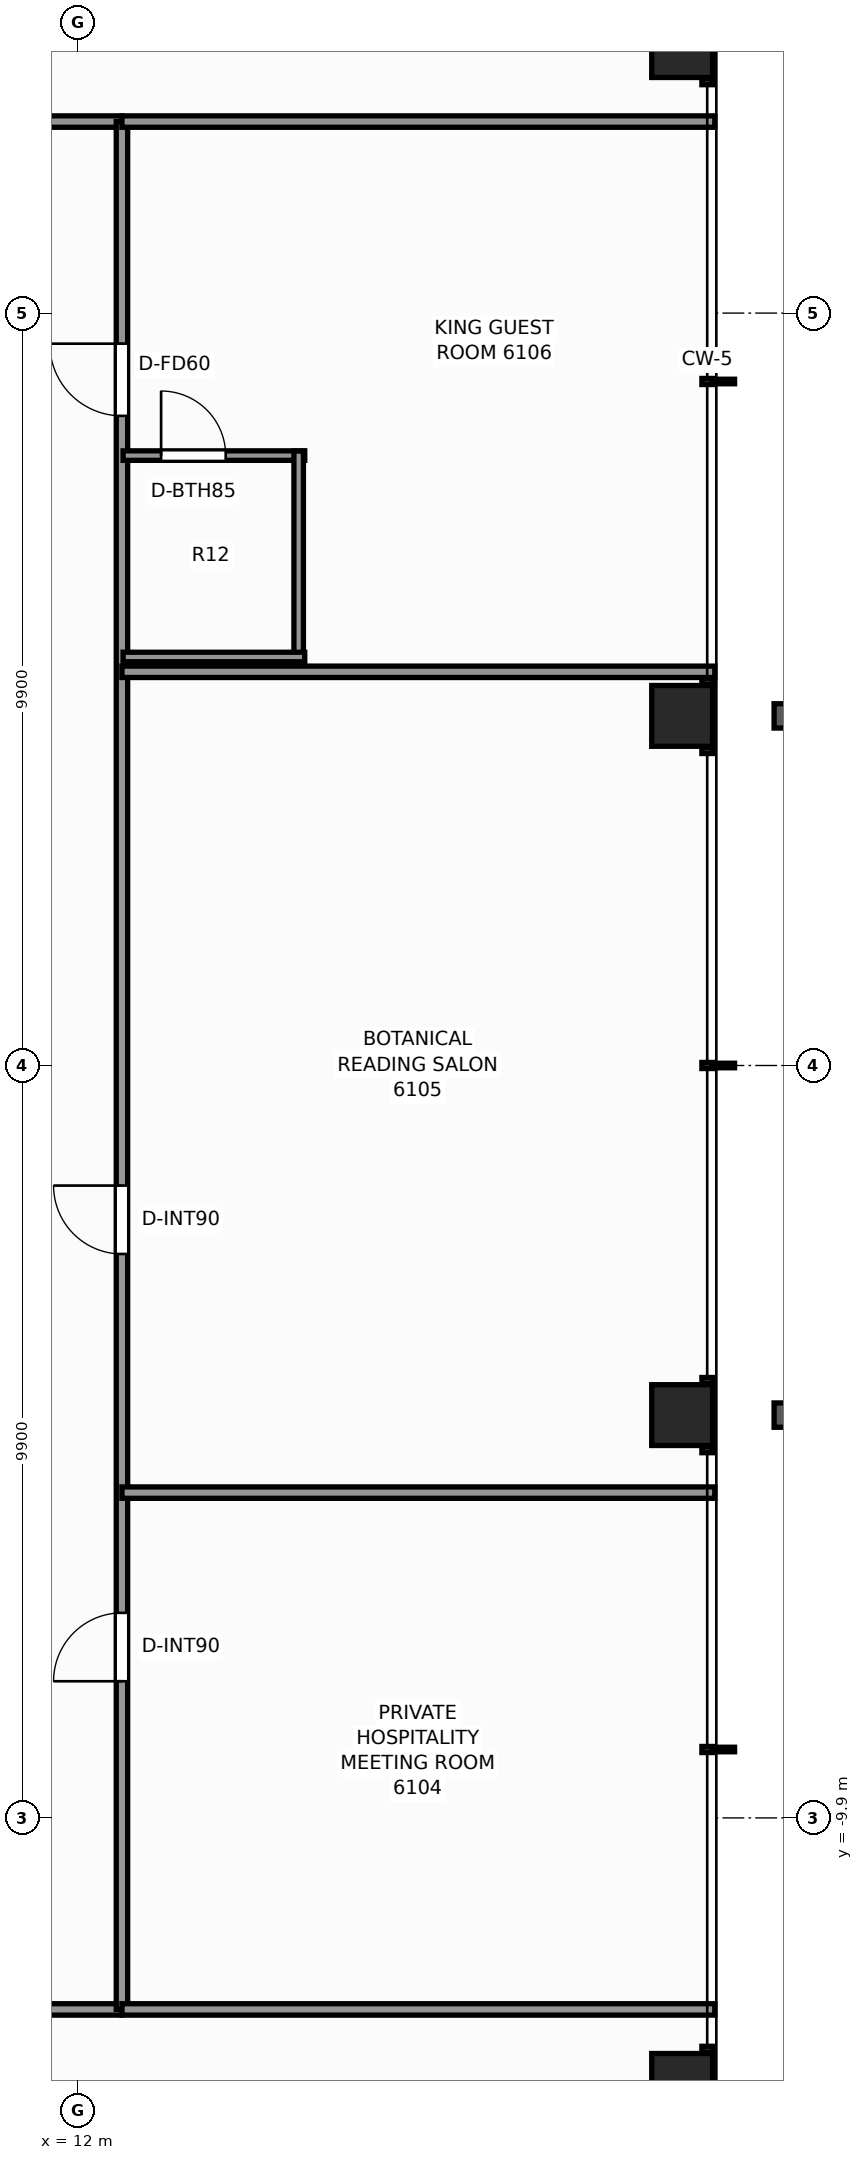
"""IFC4 building model, lengths in metres.
Left out: names, types, materials, properties, quantities, classifications, styles, units other than length and angle.
Written with IfcOpenShell. Run it as: python <this file> out.ifc"""

import sys

from ifc_helpers import new_model, si_unit, direction, frame, frame_2d, origin, origin_2d, place, context, subcontext, project, spatial, rectangle, extrude, element, fill, save


model = new_model("IFC4")
c1 = context("Model", 3, precision=1e-05, world=origin(), true_north=direction((0.0, 1.0)))
c2 = subcontext(c1, "Body", "Model", "MODEL_VIEW")
j1 = project(units=[si_unit("LENGTHUNIT", "METRE"), si_unit("PLANEANGLEUNIT", "RADIAN")], contexts=[c1])
p1 = place(None, origin())
s1 = spatial("IfcSite", under=j1, at=p1, CompositionType="ELEMENT")
p2 = place(p1, origin())
s2 = spatial("IfcBuilding", under=s1, at=p2, CompositionType="ELEMENT")
p3 = place(p2, frame((0.0, 0.0, 209.7)))
s3 = spatial("IfcBuildingStorey", under=s2, at=p3, CompositionType="ELEMENT", Elevation=209.7)
for number, where, z_axis, x_axis in (
    (1, (19.95, -13.4, 0.0), (0.0, 0.0, 1.0), (1.0, 0.0, 0.0)),
    (2, (19.95, -4.6, 0.0), (0.0, 0.0, 1.0), (1.0, 0.0, 0.0)),
    (3, (19.95, 4.6, 0.0), (0.0, 0.0, 1.0), (1.0, 0.0, 0.0)),
    (4, (19.95, 13.4, 0.0), (0.0, 0.0, 1.0), (1.0, 0.0, 0.0)),
):
    element("IfcColumn", number, at=place(p3, frame(where, z_axis=z_axis, x_axis=x_axis)), inside=s3, PredefinedType="COLUMN", context=c2, shape_type="SweptSolid", body=[
        extrude(rectangle(XDim=0.8, YDim=0.8, at=origin_2d()), origin(), (0.0, 0.0, 1.0), 3.3),
    ])
p4 = place(p3, frame((-12.58, -12.42, 0.0), z_axis=(0.0, 0.0, 1.0), x_axis=(1.0, 0.0, 0.0)))
e5 = element("IfcWall", 5, at=p4, inside=s3, PredefinedType="PARTITIONING", context=c2, shape_type="SweptSolid", body=[
    extrude(rectangle(XDim=25.16, YDim=0.15, at=frame_2d((12.58, 0.0))), origin(), (0.0, 0.0, 1.0), 2.369),
])
p5 = place(p4, frame((4.595, 0.0, 0.0)))
e6 = element("IfcOpeningElement", 6, at=p5, cuts=e5, PredefinedType="OPENING", context=c2, shape_type="SweptSolid", body=[
    extrude(rectangle(XDim=0.9, YDim=2.06, at=frame_2d((0.45, 1.03))), frame((0.0, 0.085, 0.0), z_axis=(0.0, -1.0, 0.0), x_axis=(1.0, 0.0, 0.0)), (0.0, 0.0, 1.0), 0.17),
])
p6 = place(p4, frame((10.1, 0.0, 0.0)))
e7 = element("IfcOpeningElement", 7, at=p6, cuts=e5, PredefinedType="OPENING", context=c2, shape_type="SweptSolid", body=[
    extrude(rectangle(XDim=0.9, YDim=2.06, at=frame_2d((0.45, 1.03))), frame((0.0, 0.085, 0.0), z_axis=(0.0, -1.0, 0.0), x_axis=(1.0, 0.0, 0.0)), (0.0, 0.0, 1.0), 0.17),
])
p7 = place(p4, frame((20.079, 0.0, 0.0)))
e8 = element("IfcOpeningElement", 8, at=p7, cuts=e5, PredefinedType="OPENING", context=c2, shape_type="SweptSolid", body=[
    extrude(rectangle(XDim=0.9, YDim=2.06, at=frame_2d((0.45, 1.03))), frame((0.0, 0.085, 0.0), z_axis=(0.0, -1.0, 0.0), x_axis=(1.0, 0.0, 0.0)), (0.0, 0.0, 1.0), 0.17),
])
p8 = place(p3, frame((-12.58, 12.42, 0.0), z_axis=(0.0, 0.0, 1.0), x_axis=(1.0, 0.0, 0.0)))
e9 = element("IfcWall", 9, at=p8, inside=s3, PredefinedType="PARTITIONING", context=c2, shape_type="SweptSolid", body=[
    extrude(rectangle(XDim=25.16, YDim=0.15, at=frame_2d((12.58, 0.0))), origin(), (0.0, 0.0, 1.0), 2.369),
])
p9 = place(p8, frame((4.443, 0.0, 0.0)))
e10 = element("IfcOpeningElement", 10, at=p9, cuts=e9, PredefinedType="OPENING", context=c2, shape_type="SweptSolid", body=[
    extrude(rectangle(XDim=0.9, YDim=2.06, at=frame_2d((0.45, 1.03))), frame((0.0, 0.085, 0.0), z_axis=(0.0, -1.0, 0.0), x_axis=(1.0, 0.0, 0.0)), (0.0, 0.0, 1.0), 0.17),
])
p10 = place(p8, frame((14.135, 0.0, 0.0)))
e11 = element("IfcOpeningElement", 11, at=p10, cuts=e9, PredefinedType="OPENING", context=c2, shape_type="SweptSolid", body=[
    extrude(rectangle(XDim=0.95, YDim=2.06, at=frame_2d((0.475, 1.03))), frame((0.0, 0.085, 0.0), z_axis=(0.0, -1.0, 0.0), x_axis=(1.0, 0.0, 0.0)), (0.0, 0.0, 1.0), 0.17),
])
p11 = place(p8, frame((19.817, 0.0, 0.0)))
e12 = element("IfcOpeningElement", 12, at=p11, cuts=e9, PredefinedType="OPENING", context=c2, shape_type="SweptSolid", body=[
    extrude(rectangle(XDim=0.9, YDim=2.06, at=frame_2d((0.45, 1.03))), frame((0.0, 0.085, 0.0), z_axis=(0.0, -1.0, 0.0), x_axis=(1.0, 0.0, 0.0)), (0.0, 0.0, 1.0), 0.17),
])
p12 = place(p3, frame((12.58, -12.42, 0.0), z_axis=(0.0, 0.0, 1.0), x_axis=(0.0, 1.0, 0.0)))
e13 = element("IfcWall", 13, at=p12, inside=s3, PredefinedType="PARTITIONING", context=c2, shape_type="SweptSolid", body=[
    extrude(rectangle(XDim=24.84, YDim=0.15, at=frame_2d((12.42, 0.0))), origin(), (0.0, 0.0, 1.0), 2.369),
])
p13 = place(p12, frame((4.318, 0.0, 0.0)))
e14 = element("IfcOpeningElement", 14, at=p13, cuts=e13, PredefinedType="OPENING", context=c2, shape_type="SweptSolid", body=[
    extrude(rectangle(XDim=0.9, YDim=2.06, at=frame_2d((0.45, 1.03))), frame((0.0, 0.085, 0.0), z_axis=(0.0, -1.0, 0.0), x_axis=(1.0, 0.0, 0.0)), (0.0, 0.0, 1.0), 0.17),
])
p14 = place(p12, frame((9.94, 0.0, 0.0)))
e15 = element("IfcOpeningElement", 15, at=p14, cuts=e13, PredefinedType="OPENING", context=c2, shape_type="SweptSolid", body=[
    extrude(rectangle(XDim=0.9, YDim=2.06, at=frame_2d((0.45, 1.03))), frame((0.0, 0.085, 0.0), z_axis=(0.0, -1.0, 0.0), x_axis=(1.0, 0.0, 0.0)), (0.0, 0.0, 1.0), 0.17),
])
p15 = place(p12, frame((20.968, 0.0, 0.0)))
e16 = element("IfcOpeningElement", 16, at=p15, cuts=e13, PredefinedType="OPENING", context=c2, shape_type="SweptSolid", body=[
    extrude(rectangle(XDim=0.95, YDim=2.06, at=frame_2d((0.475, 1.03))), frame((0.0, 0.085, 0.0), z_axis=(0.0, -1.0, 0.0), x_axis=(1.0, 0.0, 0.0)), (0.0, 0.0, 1.0), 0.17),
])
for number, where, z_axis, x_axis in (
    (17, (12.58, -12.42, 0.0), (0.0, 0.0, 1.0), (1.0, 0.0, 0.0)),
    (18, (12.58, 12.42, 0.0), (0.0, 0.0, 1.0), (1.0, 0.0, 0.0)),
):
    element("IfcWall", number, at=place(p3, frame(where, z_axis=z_axis, x_axis=x_axis)), inside=s3, PredefinedType="PARTITIONING", context=c2, shape_type="SweptSolid", body=[
        extrude(rectangle(XDim=7.8, YDim=0.15, at=frame_2d((3.9, 0.0))), origin(), (0.0, 0.0, 1.0), 2.369),
    ])
for number, where, z_axis, x_axis in (
    (19, (12.58, -5.62, 0.0), (0.0, 0.0, 1.0), (1.0, 0.0, 0.0)),
    (20, (12.58, 5.18, 0.0), (0.0, 0.0, 1.0), (1.0, 0.0, 0.0)),
):
    element("IfcWall", number, at=place(p3, frame(where, z_axis=z_axis, x_axis=x_axis)), inside=s3, PredefinedType="PARTITIONING", context=c2, shape_type="SweptSolid", body=[
        extrude(rectangle(XDim=7.8, YDim=0.15, at=frame_2d((3.9, 0.0))), origin(), (0.0, 0.0, 1.0), 2.453),
    ])
p16 = place(p3, frame((12.595, 8.025, 0.0), z_axis=(0.0, 0.0, 1.0), x_axis=(1.0, 0.0, 0.0)))
e21 = element("IfcWall", 21, at=p16, inside=s3, PredefinedType="PARTITIONING", context=c2, shape_type="SweptSolid", body=[
    extrude(rectangle(XDim=2.39, YDim=0.125, at=frame_2d((1.195, 0.0))), origin(), (0.0, 0.0, 1.0), 3.08),
])
p17 = place(p16, frame((0.5, 0.0, 0.0)))
e22 = element("IfcOpeningElement", 22, at=p17, cuts=e21, PredefinedType="OPENING", context=c2, shape_type="SweptSolid", body=[
    extrude(rectangle(XDim=0.85, YDim=2.03, at=frame_2d((0.425, 1.015))), frame((0.0, 0.073, 0.0), z_axis=(0.0, -1.0, 0.0), x_axis=(1.0, 0.0, 0.0)), (0.0, 0.0, 1.0), 0.145),
])
p18 = place(p3, frame((14.905, 5.315, 0.0), z_axis=(0.0, 0.0, 1.0), x_axis=(0.0, 1.0, 0.0)))
e23 = element("IfcWall", 23, at=p18, inside=s3, PredefinedType="PARTITIONING", context=c2, shape_type="SweptSolid", body=[
    extrude(rectangle(XDim=2.77, YDim=0.125, at=frame_2d((1.385, 0.0))), origin(), (0.0, 0.0, 1.0), 3.08),
])
p19 = place(p3, frame((12.595, 5.375, 0.0), z_axis=(0.0, 0.0, 1.0), x_axis=(1.0, 0.0, 0.0)))
e24 = element("IfcWall", 24, at=p19, inside=s3, PredefinedType="PARTITIONING", context=c2, shape_type="SweptSolid", body=[
    extrude(rectangle(XDim=2.39, YDim=0.125, at=frame_2d((1.195, 0.0))), origin(), (0.0, 0.0, 1.0), 3.08),
])
p20 = place(p13, origin())
e25 = element("IfcDoor", 25, at=p20, inside=s3, OperationType="SINGLE_SWING_LEFT", PredefinedType="DOOR", context=c2, shape_type="SweptSolid", body=[
    extrude(rectangle(XDim=0.9, YDim=2.06, at=frame_2d((0.45, 1.03))), frame((0.0, 0.025, 0.0), z_axis=(0.0, -1.0, 0.0), x_axis=(1.0, 0.0, 0.0)), (0.0, 0.0, 1.0), 0.05),
])
fill(e14, e25)
p21 = place(p14, origin())
e26 = element("IfcDoor", 26, at=p21, inside=s3, OperationType="SINGLE_SWING_RIGHT", PredefinedType="DOOR", context=c2, shape_type="SweptSolid", body=[
    extrude(rectangle(XDim=0.9, YDim=2.06, at=frame_2d((0.45, 1.03))), frame((0.0, 0.025, 0.0), z_axis=(0.0, -1.0, 0.0), x_axis=(1.0, 0.0, 0.0)), (0.0, 0.0, 1.0), 0.05),
])
fill(e15, e26)
p22 = place(p17, origin())
e27 = element("IfcDoor", 27, at=p22, inside=s3, OperationType="SINGLE_SWING_LEFT", PredefinedType="DOOR", context=c2, shape_type="SweptSolid", body=[
    extrude(rectangle(XDim=0.85, YDim=2.03, at=frame_2d((0.425, 1.015))), frame((0.0, 0.025, 0.0), z_axis=(0.0, -1.0, 0.0), x_axis=(1.0, 0.0, 0.0)), (0.0, 0.0, 1.0), 0.05),
])
fill(e22, e27)
p23 = place(p15, origin())
e28 = element("IfcDoor", 28, at=p23, inside=s3, OperationType="SINGLE_SWING_RIGHT", PredefinedType="DOOR", context=c2, shape_type="SweptSolid", body=[
    extrude(rectangle(XDim=0.95, YDim=2.06, at=frame_2d((0.475, 1.03))), frame((0.0, 0.025, 0.0), z_axis=(0.0, -1.0, 0.0), x_axis=(1.0, 0.0, 0.0)), (0.0, 0.0, 1.0), 0.05),
])
fill(e16, e28)
save(model, sys.argv[1])
